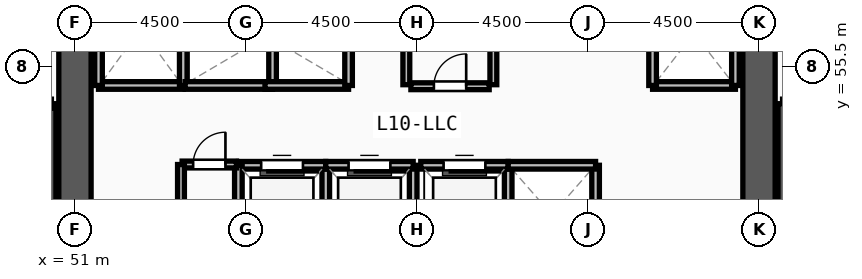
"""IFC4 building model, lengths in metres.
Left out: names, types, materials, properties, quantities, classifications, styles, units other than length and angle.
Written with IfcOpenShell. Run it as: python <this file> out.ifc"""

import sys

from ifc_helpers import new_model, si_unit, direction, frame, frame_2d, origin, place, context, subcontext, project, spatial, rectangle, extrude, source, transform, mapped, element, fill, save


model = new_model("IFC4")
c1 = context("Model", 3, precision=1e-05, world=origin(), true_north=direction((0.0, 1.0)))
c2 = subcontext(c1, "Body", "Model", "MODEL_VIEW")
j1 = project(units=[si_unit("LENGTHUNIT", "METRE"), si_unit("PLANEANGLEUNIT", "RADIAN")], contexts=[c1])
p1 = place(None, origin())
s1 = spatial("IfcSite", under=j1, at=p1, CompositionType="ELEMENT")
p2 = place(p1, origin())
s2 = spatial("IfcBuilding", under=s1, at=p2, CompositionType="ELEMENT")
p3 = place(p2, frame((0.0, 0.0, 39.75)))
s3 = spatial("IfcBuildingStorey", under=s2, at=p3, CompositionType="ELEMENT", Elevation=39.75)
p4 = place(p3, frame((69.0, 60.675, 0.0), z_axis=(0.0, 0.0, 1.0), x_axis=(0.0, -1.0, 0.0)))
e1 = element("IfcWall", 1, at=p4, inside=s3, PredefinedType="SHEAR", context=c2, shape_type="SweptSolid", body=[
    extrude(rectangle(XDim=13.35, YDim=0.85, at=frame_2d((6.675, 0.0))), origin(), (0.0, 0.0, 1.0), 3.57),
])
m1 = source(origin(), c2, "Body", "SweptSolid", [
    extrude(rectangle(XDim=1.2, YDim=2.2, at=frame_2d((0.6, 1.1))), frame((0.0, 0.435, 0.0), z_axis=(0.0, -1.0, 0.0), x_axis=(1.0, 0.0, 0.0)), (0.0, 0.0, 1.0), 0.87),
])
p5 = place(p4, frame((1.125, 0.0, 0.0)))
e2 = element("IfcOpeningElement", 2, at=p5, cuts=e1, PredefinedType="OPENING", context=c2, shape_type="MappedRepresentation", body=[
    mapped(m1, transform((0.0, 0.0, 0.0), x_axis=(1.0, 0.0, 0.0), y_axis=(0.0, 1.0, 0.0), z_axis=(0.0, 0.0, 1.0), scale=1.0)),
])
p6 = place(p3, frame((51.0, 47.325, 0.0), z_axis=(0.0, 0.0, 1.0), x_axis=(0.0, 1.0, 0.0)))
e3 = element("IfcWall", 3, at=p6, inside=s3, PredefinedType="SHEAR", context=c2, shape_type="SweptSolid", body=[
    extrude(rectangle(XDim=13.35, YDim=0.85, at=frame_2d((6.675, 0.0))), origin(), (0.0, 0.0, 1.0), 3.57),
])
for number, where, z_axis, x_axis in (
    (4, (50.38, 46.7, 0.0), (0.0, 0.0, 1.0), (0.0, 1.0, 0.0)),
    (5, (69.62, 54.52, 0.0), (0.0, 0.0, 1.0), (0.0, -1.0, 0.0)),
):
    element("IfcWall", number, at=place(p3, frame(where, z_axis=z_axis, x_axis=x_axis)), inside=s3, PredefinedType="SOLIDWALL", context=c2, shape_type="SweptSolid", body=[
        extrude(rectangle(XDim=7.82, YDim=0.24, at=frame_2d((3.91, 0.0))), origin(), (0.0, 0.0, 1.0), 3.57),
    ])
p7 = place(p3, frame((51.62, 55.0, 0.0), z_axis=(0.0, 0.0, 1.0), x_axis=(1.0, 0.0, 0.0)))
e6 = element("IfcWall", 6, at=p7, inside=s3, PredefinedType="SOLIDWALL", context=c2, shape_type="SweptSolid", body=[
    extrude(rectangle(XDim=2.23, YDim=0.2, at=frame_2d((1.115, 0.0))), origin(), (0.0, 0.0, 1.0), 3.57),
])
for number, where, z_axis, x_axis in (
    (7, (53.85, 55.0, 0.0), (0.0, 0.0, 1.0), (0.0, 1.0, 0.0)),
    (8, (51.62, 58.0, 0.0), (0.0, 0.0, 1.0), (0.0, -1.0, 0.0)),
):
    element("IfcWall", number, at=place(p3, frame(where, z_axis=z_axis, x_axis=x_axis)), inside=s3, PredefinedType="SOLIDWALL", context=c2, shape_type="SweptSolid", body=[
        extrude(rectangle(XDim=3.0, YDim=0.2, at=frame_2d((1.5, 0.0))), origin(), (0.0, 0.0, 1.0), 3.57),
    ])
p8 = place(p3, frame((66.2, 55.0, 0.0), z_axis=(0.0, 0.0, 1.0), x_axis=(1.0, 0.0, 0.0)))
e9 = element("IfcWall", 9, at=p8, inside=s3, PredefinedType="SOLIDWALL", context=c2, shape_type="SweptSolid", body=[
    extrude(rectangle(XDim=2.18, YDim=0.2, at=frame_2d((1.09, 0.0))), origin(), (0.0, 0.0, 1.0), 3.57),
])
for number, where, z_axis, x_axis in (
    (10, (68.38, 55.0, 0.0), (0.0, 0.0, 1.0), (0.0, 1.0, 0.0)),
    (11, (66.2, 57.75, 0.0), (0.0, 0.0, 1.0), (0.0, -1.0, 0.0)),
):
    element("IfcWall", number, at=place(p3, frame(where, z_axis=z_axis, x_axis=x_axis)), inside=s3, PredefinedType="SOLIDWALL", context=c2, shape_type="SweptSolid", body=[
        extrude(rectangle(XDim=2.75, YDim=0.2, at=frame_2d((1.375, 0.0))), origin(), (0.0, 0.0, 1.0), 3.57),
    ])
p9 = place(p3, frame((57.6, 50.3, 0.0), z_axis=(0.0, 0.0, 1.0), x_axis=(0.0, 1.0, 0.0)))
e12 = element("IfcWall", 12, at=p9, inside=s3, PredefinedType="SOLIDWALL", context=c2, shape_type="SweptSolid", body=[
    extrude(rectangle(XDim=2.6, YDim=0.2, at=frame_2d((1.3, 0.0))), origin(), (0.0, 0.0, 1.0), 3.57),
])
p10 = place(p3, frame((57.6, 52.9, 0.0), z_axis=(0.0, 0.0, 1.0), x_axis=(-1.0, 0.0, 0.0)))
e13 = element("IfcWall", 13, at=p10, inside=s3, PredefinedType="SOLIDWALL", context=c2, shape_type="SweptSolid", body=[
    extrude(rectangle(XDim=2.3, YDim=0.2, at=frame_2d((1.15, 0.0))), origin(), (0.0, 0.0, 1.0), 3.57),
])
m2 = source(origin(), c2, "Body", "SweptSolid", [
    extrude(rectangle(XDim=1.1, YDim=2.2, at=frame_2d((0.55, 1.1))), frame((0.0, 0.11, 0.0), z_axis=(0.0, -1.0, 0.0), x_axis=(1.0, 0.0, 0.0)), (0.0, 0.0, 1.0), 0.22),
])
p11 = place(p10, frame((0.6, 0.0, 0.0)))
e14 = element("IfcOpeningElement", 14, at=p11, cuts=e13, PredefinedType="OPENING", context=c2, shape_type="MappedRepresentation", body=[
    mapped(m2, transform((0.0, 0.0, 0.0), x_axis=(1.0, 0.0, 0.0), y_axis=(0.0, 1.0, 0.0), z_axis=(0.0, 0.0, 1.0), scale=1.0)),
])
for number, where, z_axis, x_axis in (
    (15, (55.3, 52.9, 0.0), (0.0, 0.0, 1.0), (0.0, -1.0, 0.0)),
    (16, (59.9, 50.3, 0.0), (0.0, 0.0, 1.0), (0.0, 1.0, 0.0)),
):
    element("IfcWall", number, at=place(p3, frame(where, z_axis=z_axis, x_axis=x_axis)), inside=s3, PredefinedType="SOLIDWALL", context=c2, shape_type="SweptSolid", body=[
        extrude(rectangle(XDim=2.6, YDim=0.2, at=frame_2d((1.3, 0.0))), origin(), (0.0, 0.0, 1.0), 3.57),
    ])
p12 = place(p3, frame((59.9, 52.9, 0.0), z_axis=(0.0, 0.0, 1.0), x_axis=(-1.0, 0.0, 0.0)))
e17 = element("IfcWall", 17, at=p12, inside=s3, PredefinedType="SOLIDWALL", context=c2, shape_type="SweptSolid", body=[
    extrude(rectangle(XDim=2.3, YDim=0.2, at=frame_2d((1.15, 0.0))), origin(), (0.0, 0.0, 1.0), 3.57),
])
p13 = place(p12, frame((0.6, 0.0, 0.0)))
e18 = element("IfcOpeningElement", 18, at=p13, cuts=e17, PredefinedType="OPENING", context=c2, shape_type="MappedRepresentation", body=[
    mapped(m2, transform((0.0, 0.0, 0.0), x_axis=(1.0, 0.0, 0.0), y_axis=(0.0, 1.0, 0.0), z_axis=(0.0, 0.0, 1.0), scale=1.0)),
])
p14 = place(p3, frame((62.4, 50.3, 0.0), z_axis=(0.0, 0.0, 1.0), x_axis=(0.0, 1.0, 0.0)))
e19 = element("IfcWall", 19, at=p14, inside=s3, PredefinedType="SOLIDWALL", context=c2, shape_type="SweptSolid", body=[
    extrude(rectangle(XDim=2.6, YDim=0.2, at=frame_2d((1.3, 0.0))), origin(), (0.0, 0.0, 1.0), 3.57),
])
p15 = place(p3, frame((62.4, 52.9, 0.0), z_axis=(0.0, 0.0, 1.0), x_axis=(-1.0, 0.0, 0.0)))
e20 = element("IfcWall", 20, at=p15, inside=s3, PredefinedType="SOLIDWALL", context=c2, shape_type="SweptSolid", body=[
    extrude(rectangle(XDim=2.3, YDim=0.2, at=frame_2d((1.15, 0.0))), origin(), (0.0, 0.0, 1.0), 3.57),
])
p16 = place(p15, frame((0.6, 0.0, 0.0)))
e21 = element("IfcOpeningElement", 21, at=p16, cuts=e20, PredefinedType="OPENING", context=c2, shape_type="MappedRepresentation", body=[
    mapped(m2, transform((0.0, 0.0, 0.0), x_axis=(1.0, 0.0, 0.0), y_axis=(0.0, 1.0, 0.0), z_axis=(0.0, 0.0, 1.0), scale=1.0)),
])
p17 = place(p3, frame((64.7, 50.3, 0.0), z_axis=(0.0, 0.0, 1.0), x_axis=(0.0, 1.0, 0.0)))
e22 = element("IfcWall", 22, at=p17, inside=s3, PredefinedType="SOLIDWALL", context=c2, shape_type="SweptSolid", body=[
    extrude(rectangle(XDim=2.6, YDim=0.2, at=frame_2d((1.3, 0.0))), origin(), (0.0, 0.0, 1.0), 3.57),
])
for number, where, z_axis, x_axis in (
    (23, (64.7, 52.9, 0.0), (0.0, 0.0, 1.0), (-1.0, 0.0, 0.0)),
    (24, (53.9, 55.0, 0.0), (0.0, 0.0, 1.0), (1.0, 0.0, 0.0)),
):
    element("IfcWall", number, at=place(p3, frame(where, z_axis=z_axis, x_axis=x_axis)), inside=s3, PredefinedType="SOLIDWALL", context=c2, shape_type="SweptSolid", body=[
        extrude(rectangle(XDim=2.3, YDim=0.2, at=frame_2d((1.15, 0.0))), origin(), (0.0, 0.0, 1.0), 3.57),
    ])
p18 = place(p3, frame((56.2, 55.0, 0.0), z_axis=(0.0, 0.0, 1.0), x_axis=(0.0, 1.0, 0.0)))
e25 = element("IfcWall", 25, at=p18, inside=s3, PredefinedType="SOLIDWALL", context=c2, shape_type="SweptSolid", body=[
    extrude(rectangle(XDim=2.6, YDim=0.2, at=frame_2d((1.3, 0.0))), origin(), (0.0, 0.0, 1.0), 3.57),
])
p19 = place(p3, frame((56.0, 55.0, 0.0), z_axis=(0.0, 0.0, 1.0), x_axis=(1.0, 0.0, 0.0)))
e26 = element("IfcWall", 26, at=p19, inside=s3, PredefinedType="SOLIDWALL", context=c2, shape_type="SweptSolid", body=[
    extrude(rectangle(XDim=2.2, YDim=0.2, at=frame_2d((1.1, 0.0))), origin(), (0.0, 0.0, 1.0), 3.57),
])
p20 = place(p3, frame((58.2, 55.0, 0.0), z_axis=(0.0, 0.0, 1.0), x_axis=(0.0, 1.0, 0.0)))
e27 = element("IfcWall", 27, at=p20, inside=s3, PredefinedType="SOLIDWALL", context=c2, shape_type="SweptSolid", body=[
    extrude(rectangle(XDim=2.6, YDim=0.2, at=frame_2d((1.3, 0.0))), origin(), (0.0, 0.0, 1.0), 3.57),
])
p21 = place(p3, frame((59.84, 54.98, 0.0), z_axis=(0.0, 0.0, 1.0), x_axis=(1.0, 0.0, 0.0)))
e28 = element("IfcWall", 28, at=p21, inside=s3, PredefinedType="PARTITIONING", context=c2, shape_type="SweptSolid", body=[
    extrude(rectangle(XDim=2.06, YDim=0.18, at=frame_2d((1.03, 0.0))), origin(), (0.0, 0.0, 1.0), 3.57),
])
m3 = source(origin(), c2, "Body", "SweptSolid", [
    extrude(rectangle(XDim=0.85, YDim=2.1, at=frame_2d((0.425, 1.05))), frame((0.0, 0.1, 0.0), z_axis=(0.0, -1.0, 0.0), x_axis=(1.0, 0.0, 0.0)), (0.0, 0.0, 1.0), 0.2),
])
p22 = place(p21, frame((0.605, 0.0, 0.0)))
e29 = element("IfcOpeningElement", 29, at=p22, cuts=e28, PredefinedType="OPENING", context=c2, shape_type="MappedRepresentation", body=[
    mapped(m3, transform((0.0, 0.0, 0.0), x_axis=(1.0, 0.0, 0.0), y_axis=(0.0, 1.0, 0.0), z_axis=(0.0, 0.0, 1.0), scale=1.0)),
])
p23 = place(p3, frame((53.82, 52.92, 0.0), z_axis=(0.0, 0.0, 1.0), x_axis=(1.0, 0.0, 0.0)))
e30 = element("IfcWall", 30, at=p23, inside=s3, PredefinedType="PARTITIONING", context=c2, shape_type="SweptSolid", body=[
    extrude(rectangle(XDim=1.43, YDim=0.18, at=frame_2d((0.715, 0.0))), origin(), (0.0, 0.0, 1.0), 3.57),
])
p24 = place(p23, frame((0.29, 0.0, 0.0)))
e31 = element("IfcOpeningElement", 31, at=p24, cuts=e30, PredefinedType="OPENING", context=c2, shape_type="MappedRepresentation", body=[
    mapped(m3, transform((0.0, 0.0, 0.0), x_axis=(1.0, 0.0, 0.0), y_axis=(0.0, 1.0, 0.0), z_axis=(0.0, 0.0, 1.0), scale=1.0)),
])
for number, where, z_axis, x_axis in (
    (32, (59.72, 55.02, 0.0), (0.0, 0.0, 1.0), (0.0, 1.0, 0.0)),
    (33, (62.01, 55.02, 0.0), (0.0, 0.0, 1.0), (0.0, 1.0, 0.0)),
):
    element("IfcWall", number, at=place(p3, frame(where, z_axis=z_axis, x_axis=x_axis)), inside=s3, PredefinedType="PARTITIONING", context=c2, shape_type="SweptSolid", body=[
        extrude(rectangle(XDim=2.88, YDim=0.18, at=frame_2d((1.44, 0.0))), origin(), (0.0, 0.0, 1.0), 3.57),
    ])
p25 = place(p3, frame((53.79, 50.35, 0.0), z_axis=(0.0, 0.0, 1.0), x_axis=(0.0, 1.0, 0.0)))
e34 = element("IfcWall", 34, at=p25, inside=s3, PredefinedType="PARTITIONING", context=c2, shape_type="SweptSolid", body=[
    extrude(rectangle(XDim=2.57, YDim=0.18, at=frame_2d((1.285, 0.0))), origin(), (0.0, 0.0, 1.0), 3.57),
])
m4 = source(origin(), c2, "Body", "SweptSolid", [
    extrude(rectangle(XDim=1.1, YDim=2.2, at=frame_2d((0.55, 1.1))), frame((0.0, 0.025, 0.0), z_axis=(0.0, -1.0, 0.0), x_axis=(1.0, 0.0, 0.0)), (0.0, 0.0, 1.0), 0.05),
])
p26 = place(p11, origin())
e35 = element("IfcDoor", 35, at=p26, inside=s3, OperationType="SLIDING_TO_LEFT", PredefinedType="DOOR", context=c2, shape_type="MappedRepresentation", body=[
    mapped(m4, transform((0.0, 0.0, 0.0), x_axis=(1.0, 0.0, 0.0), y_axis=(0.0, 1.0, 0.0), z_axis=(0.0, 0.0, 1.0), scale=1.0)),
])
fill(e14, e35)
p27 = place(p13, origin())
e36 = element("IfcDoor", 36, at=p27, inside=s3, OperationType="SLIDING_TO_LEFT", PredefinedType="DOOR", context=c2, shape_type="MappedRepresentation", body=[
    mapped(m4, transform((0.0, 0.0, 0.0), x_axis=(1.0, 0.0, 0.0), y_axis=(0.0, 1.0, 0.0), z_axis=(0.0, 0.0, 1.0), scale=1.0)),
])
fill(e18, e36)
p28 = place(p16, origin())
e37 = element("IfcDoor", 37, at=p28, inside=s3, OperationType="SLIDING_TO_LEFT", PredefinedType="DOOR", context=c2, shape_type="MappedRepresentation", body=[
    mapped(m4, transform((0.0, 0.0, 0.0), x_axis=(1.0, 0.0, 0.0), y_axis=(0.0, 1.0, 0.0), z_axis=(0.0, 0.0, 1.0), scale=1.0)),
])
fill(e21, e37)
m5 = source(origin(), c2, "Body", "SweptSolid", [
    extrude(rectangle(XDim=0.85, YDim=2.1, at=frame_2d((0.425, 1.05))), frame((0.0, 0.025, 0.0), z_axis=(0.0, -1.0, 0.0), x_axis=(1.0, 0.0, 0.0)), (0.0, 0.0, 1.0), 0.05),
])
p29 = place(p22, origin())
e38 = element("IfcDoor", 38, at=p29, inside=s3, OperationType="SINGLE_SWING_RIGHT", PredefinedType="DOOR", context=c2, shape_type="MappedRepresentation", body=[
    mapped(m5, transform((0.0, 0.0, 0.0), x_axis=(1.0, 0.0, 0.0), y_axis=(0.0, 1.0, 0.0), z_axis=(0.0, 0.0, 1.0), scale=1.0)),
])
fill(e29, e38)
p30 = place(p24, origin())
e39 = element("IfcDoor", 39, at=p30, inside=s3, OperationType="SINGLE_SWING_RIGHT", PredefinedType="DOOR", context=c2, shape_type="MappedRepresentation", body=[
    mapped(m5, transform((0.0, 0.0, 0.0), x_axis=(1.0, 0.0, 0.0), y_axis=(0.0, 1.0, 0.0), z_axis=(0.0, 0.0, 1.0), scale=1.0)),
])
fill(e31, e39)
save(model, sys.argv[1])
